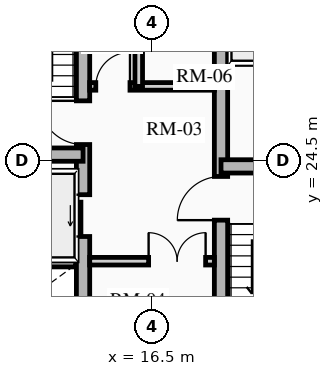
"""IFC4 building model, lengths in metres.
Left out: names, types, materials, properties, quantities, classifications, styles, units other than length and angle.
Written with IfcOpenShell. Run it as: python <this file> out.ifc"""

import sys

from ifc_helpers import new_model, si_unit, direction, frame, frame_2d, origin, place, context, subcontext, project, spatial, rectangle, extrude, source, transform, mapped, element, fill, save


model = new_model("IFC4")
c1 = context("Model", 3, precision=1e-05, world=origin(), true_north=direction((0.0, 1.0)))
c2 = subcontext(c1, "Body", "Model", "MODEL_VIEW")
j1 = project(units=[si_unit("LENGTHUNIT", "METRE"), si_unit("PLANEANGLEUNIT", "RADIAN")], contexts=[c1])
p1 = place(None, origin())
s1 = spatial("IfcSite", under=j1, at=p1, CompositionType="ELEMENT")
p2 = place(p1, origin())
s2 = spatial("IfcBuilding", under=s1, at=p2, CompositionType="ELEMENT")
p3 = place(p2, frame((0.0, 0.0, 96.34)))
s3 = spatial("IfcBuildingStorey", under=s2, at=p3, CompositionType="ELEMENT", Elevation=96.34)
p4 = place(p3, frame((14.685, 17.625, 0.0), z_axis=(0.0, 0.0, 1.0), x_axis=(0.0, 1.0, 0.0)))
e1 = element("IfcWall", 1, at=p4, inside=s3, PredefinedType="SHEAR", context=c2, shape_type="SweptSolid", body=[
    extrude(rectangle(XDim=13.75, YDim=0.35, at=frame_2d((6.875, 0.0))), origin(), (0.0, 0.0, 1.0), 2.91),
])
m1 = source(origin(), c2, "Body", "SweptSolid", [
    extrude(rectangle(XDim=1.1, YDim=2.015, at=frame_2d((0.55, 1.007))), frame((0.0, 0.185, 0.0), z_axis=(0.0, -1.0, 0.0), x_axis=(1.0, 0.0, 0.0)), (0.0, 0.0, 1.0), 0.37),
])
p5 = place(p4, frame((4.875, 0.0, 0.0)))
e2 = element("IfcOpeningElement", 2, at=p5, cuts=e1, PredefinedType="OPENING", context=c2, shape_type="MappedRepresentation", body=[
    mapped(m1, transform((0.0, 0.0, 0.0), x_axis=(1.0, 0.0, 0.0), y_axis=(0.0, 1.0, 0.0), z_axis=(0.0, 0.0, 1.0), scale=1.0)),
])
m2 = source(origin(), c2, "Body", "SweptSolid", [
    extrude(rectangle(XDim=1.15, YDim=2.02, at=frame_2d((0.575, 1.01))), frame((0.0, 0.185, 0.0), z_axis=(0.0, -1.0, 0.0), x_axis=(1.0, 0.0, 0.0)), (0.0, 0.0, 1.0), 0.37),
])
p6 = place(p4, frame((7.295, 0.0, 0.0)))
e3 = element("IfcOpeningElement", 3, at=p6, cuts=e1, PredefinedType="OPENING", context=c2, shape_type="MappedRepresentation", body=[
    mapped(m2, transform((0.0, 0.0, 0.0), x_axis=(1.0, 0.0, 0.0), y_axis=(0.0, 1.0, 0.0), z_axis=(0.0, 0.0, 1.0), scale=1.0)),
])
p7 = place(p3, frame((18.315, 17.625, 0.0), z_axis=(0.0, 0.0, 1.0), x_axis=(0.0, 1.0, 0.0)))
e4 = element("IfcWall", 4, at=p7, inside=s3, PredefinedType="SHEAR", context=c2, shape_type="SweptSolid", body=[
    extrude(rectangle(XDim=13.75, YDim=0.35, at=frame_2d((6.875, 0.0))), origin(), (0.0, 0.0, 1.0), 2.91),
])
p8 = place(p7, frame((10.0, 0.0, 0.0)))
e5 = element("IfcOpeningElement", 5, at=p8, cuts=e4, PredefinedType="OPENING", context=c2, shape_type="MappedRepresentation", body=[
    mapped(m1, transform((0.0, 0.0, 0.0), x_axis=(1.0, 0.0, 0.0), y_axis=(0.0, 1.0, 0.0), z_axis=(0.0, 0.0, 1.0), scale=1.0)),
])
p9 = place(p7, frame((12.0, 0.0, 0.0)))
e6 = element("IfcOpeningElement", 6, at=p9, cuts=e4, PredefinedType="OPENING", context=c2, shape_type="MappedRepresentation", body=[
    mapped(m1, transform((0.0, 0.0, 0.0), x_axis=(1.0, 0.0, 0.0), y_axis=(0.0, 1.0, 0.0), z_axis=(0.0, 0.0, 1.0), scale=1.0)),
])
p10 = place(p7, frame((5.305, 0.0, 0.0)))
e7 = element("IfcOpeningElement", 7, at=p10, cuts=e4, PredefinedType="OPENING", context=c2, shape_type="MappedRepresentation", body=[
    mapped(m2, transform((0.0, 0.0, 0.0), x_axis=(1.0, 0.0, 0.0), y_axis=(0.0, 1.0, 0.0), z_axis=(0.0, 0.0, 1.0), scale=1.0)),
])
for number, where, z_axis, x_axis in (
    (8, (11.4, 24.655, 0.0), (0.0, 0.0, 1.0), (1.0, 0.0, 0.0)),
    (9, (18.315, 24.345, 0.0), (0.0, 0.0, 1.0), (1.0, 0.0, 0.0)),
):
    element("IfcWall", number, at=place(p3, frame(where, z_axis=z_axis, x_axis=x_axis)), inside=s3, PredefinedType="SHEAR", context=c2, shape_type="SweptSolid", body=[
        extrude(rectangle(XDim=3.285, YDim=0.35, at=frame_2d((1.643, 0.0))), origin(), (0.0, 0.0, 1.0), 2.91),
    ])
for number, where, z_axis, x_axis in (
    (10, (11.52, 21.8, 0.0), (0.0, 0.0, 1.0), (1.0, 0.0, 0.0)),
    (11, (18.51, 27.13, 0.0), (0.0, 0.0, 1.0), (1.0, 0.0, 0.0)),
):
    element("IfcWall", number, at=place(p3, frame(where, z_axis=z_axis, x_axis=x_axis)), inside=s3, PredefinedType="SHEAR", context=c2, shape_type="SweptSolid", body=[
        extrude(rectangle(XDim=2.97, YDim=0.2, at=frame_2d((1.485, 0.0))), origin(), (0.0, 0.0, 1.0), 2.91),
    ])
p11 = place(p3, frame((14.86, 21.85, 0.0), z_axis=(0.0, 0.0, 1.0), x_axis=(1.0, 0.0, 0.0)))
e12 = element("IfcWall", 12, at=p11, inside=s3, PredefinedType="PARTITIONING", context=c2, shape_type="SweptSolid", body=[
    extrude(rectangle(XDim=3.28, YDim=0.2, at=frame_2d((1.64, 0.0))), origin(), (0.0, 0.0, 1.0), 2.655),
])
m3 = source(origin(), c2, "Body", "SweptSolid", [
    extrude(rectangle(XDim=1.5, YDim=2.02, at=frame_2d((0.75, 1.01))), frame((0.0, 0.11, 0.0), z_axis=(0.0, -1.0, 0.0), x_axis=(1.0, 0.0, 0.0)), (0.0, 0.0, 1.0), 0.22),
])
p12 = place(p11, frame((1.55, 0.0, 0.0)))
e13 = element("IfcOpeningElement", 13, at=p12, cuts=e12, PredefinedType="OPENING", context=c2, shape_type="MappedRepresentation", body=[
    mapped(m3, transform((0.0, 0.0, 0.0), x_axis=(1.0, 0.0, 0.0), y_axis=(0.0, 1.0, 0.0), z_axis=(0.0, 0.0, 1.0), scale=1.0)),
])
p13 = place(p3, frame((14.86, 26.45, 0.0), z_axis=(0.0, 0.0, 1.0), x_axis=(1.0, 0.0, 0.0)))
e14 = element("IfcWall", 14, at=p13, inside=s3, PredefinedType="PARTITIONING", context=c2, shape_type="SweptSolid", body=[
    extrude(rectangle(XDim=3.28, YDim=0.2, at=frame_2d((1.64, 0.0))), origin(), (0.0, 0.0, 1.0), 2.655),
])
m4 = source(origin(), c2, "Body", "SweptSolid", [
    extrude(rectangle(XDim=0.9, YDim=2.005, at=frame_2d((0.45, 1.002))), frame((0.0, 0.11, 0.0), z_axis=(0.0, -1.0, 0.0), x_axis=(1.0, 0.0, 0.0)), (0.0, 0.0, 1.0), 0.22),
])
p14 = place(p13, frame((0.16, 0.0, 0.0)))
e15 = element("IfcOpeningElement", 15, at=p14, cuts=e14, PredefinedType="OPENING", context=c2, shape_type="MappedRepresentation", body=[
    mapped(m4, transform((0.0, 0.0, 0.0), x_axis=(1.0, 0.0, 0.0), y_axis=(0.0, 1.0, 0.0), z_axis=(0.0, 0.0, 1.0), scale=1.0)),
])
p15 = place(p3, frame((16.15, 26.45, 0.0), z_axis=(0.0, 0.0, 1.0), x_axis=(0.0, 1.0, 0.0)))
e16 = element("IfcWall", 16, at=p15, inside=s3, PredefinedType="PARTITIONING", context=c2, shape_type="SweptSolid", body=[
    extrude(rectangle(XDim=2.4, YDim=0.2, at=frame_2d((1.2, 0.0))), origin(), (0.0, 0.0, 1.0), 2.655),
])
m5 = source(origin(), c2, "Body", "SweptSolid", [
    extrude(rectangle(XDim=1.1, YDim=2.015, at=frame_2d((0.55, 1.007))), frame((0.0, 0.025, 0.0), z_axis=(0.0, -1.0, 0.0), x_axis=(1.0, 0.0, 0.0)), (0.0, 0.0, 1.0), 0.05),
])
p16 = place(p5, origin())
e17 = element("IfcDoor", 17, at=p16, inside=s3, OperationType="SLIDING_TO_LEFT", PredefinedType="DOOR", context=c2, shape_type="MappedRepresentation", body=[
    mapped(m5, transform((0.0, 0.0, 0.0), x_axis=(1.0, 0.0, 0.0), y_axis=(0.0, 1.0, 0.0), z_axis=(0.0, 0.0, 1.0), scale=1.0)),
])
fill(e2, e17)
m6 = source(origin(), c2, "Body", "SweptSolid", [
    extrude(rectangle(XDim=1.15, YDim=2.02, at=frame_2d((0.575, 1.01))), frame((0.0, 0.025, 0.0), z_axis=(0.0, -1.0, 0.0), x_axis=(1.0, 0.0, 0.0)), (0.0, 0.0, 1.0), 0.05),
])
p17 = place(p6, origin())
e18 = element("IfcDoor", 18, at=p17, inside=s3, OperationType="SINGLE_SWING_RIGHT", PredefinedType="DOOR", context=c2, shape_type="MappedRepresentation", body=[
    mapped(m6, transform((0.0, 0.0, 0.0), x_axis=(1.0, 0.0, 0.0), y_axis=(0.0, 1.0, 0.0), z_axis=(0.0, 0.0, 1.0), scale=1.0)),
])
fill(e3, e18)
p18 = place(p10, origin())
e19 = element("IfcDoor", 19, at=p18, inside=s3, OperationType="SINGLE_SWING_LEFT", PredefinedType="DOOR", context=c2, shape_type="MappedRepresentation", body=[
    mapped(m6, transform((0.0, 0.0, 0.0), x_axis=(1.0, 0.0, 0.0), y_axis=(0.0, 1.0, 0.0), z_axis=(0.0, 0.0, 1.0), scale=1.0)),
])
fill(e7, e19)
m7 = source(origin(), c2, "Body", "SweptSolid", [
    extrude(rectangle(XDim=1.5, YDim=2.02, at=frame_2d((0.75, 1.01))), frame((0.0, 0.025, 0.0), z_axis=(0.0, -1.0, 0.0), x_axis=(1.0, 0.0, 0.0)), (0.0, 0.0, 1.0), 0.05),
])
p19 = place(p12, origin())
e20 = element("IfcDoor", 20, at=p19, inside=s3, OperationType="DOUBLE_DOOR_SINGLE_SWING", PredefinedType="DOOR", context=c2, shape_type="MappedRepresentation", body=[
    mapped(m7, transform((0.0, 0.0, 0.0), x_axis=(1.0, 0.0, 0.0), y_axis=(0.0, 1.0, 0.0), z_axis=(0.0, 0.0, 1.0), scale=1.0)),
])
fill(e13, e20)
m8 = source(origin(), c2, "Body", "SweptSolid", [
    extrude(rectangle(XDim=0.9, YDim=2.005, at=frame_2d((0.45, 1.002))), frame((0.0, 0.025, 0.0), z_axis=(0.0, -1.0, 0.0), x_axis=(1.0, 0.0, 0.0)), (0.0, 0.0, 1.0), 0.05),
])
p20 = place(p14, origin())
e21 = element("IfcDoor", 21, at=p20, inside=s3, OperationType="SINGLE_SWING_RIGHT", PredefinedType="DOOR", context=c2, shape_type="MappedRepresentation", body=[
    mapped(m8, transform((0.0, 0.0, 0.0), x_axis=(1.0, 0.0, 0.0), y_axis=(0.0, 1.0, 0.0), z_axis=(0.0, 0.0, 1.0), scale=1.0)),
])
fill(e15, e21)
save(model, sys.argv[1])
